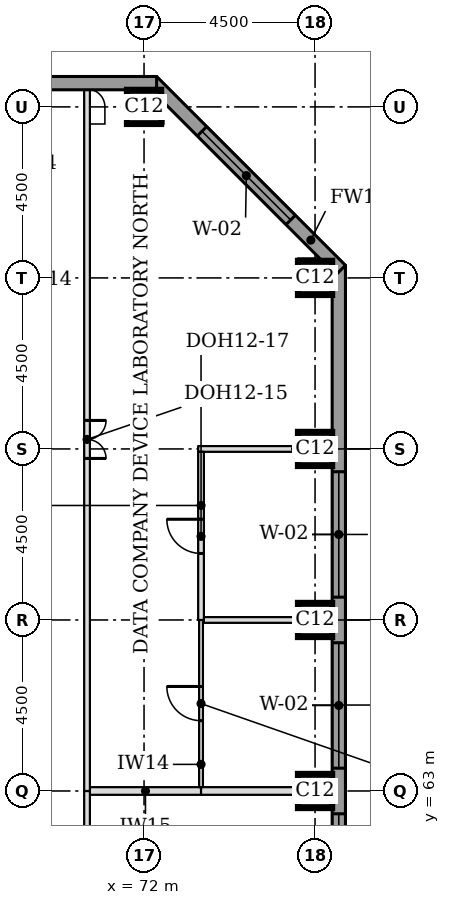
"""IFC4 building model, lengths in metres.
Left out: names, types, materials, properties, quantities, classifications, styles, units other than length and angle.
Written with IfcOpenShell. Run it as: python <this file> out.ifc"""

import sys

from ifc_helpers import new_model, si_unit, direction, frame, frame_2d, origin, origin_2d, place, context, subcontext, project, spatial, rectangle, extrude, element, fill, save


model = new_model("IFC4")
c1 = context("Model", 3, precision=1e-05, world=origin(), true_north=direction((0.0, 1.0)))
c2 = subcontext(c1, "Body", "Model", "MODEL_VIEW")
j1 = project(units=[si_unit("LENGTHUNIT", "METRE"), si_unit("PLANEANGLEUNIT", "RADIAN")], contexts=[c1])
p1 = place(None, origin())
s1 = spatial("IfcSite", under=j1, at=p1, CompositionType="ELEMENT")
p2 = place(p1, origin())
s2 = spatial("IfcBuilding", under=s1, at=p2, CompositionType="ELEMENT")
p3 = place(p2, frame((0.0, 0.0, 245.2)))
s3 = spatial("IfcBuildingStorey", under=s2, at=p3, CompositionType="ELEMENT", Elevation=245.2)
for number, where, z_axis, x_axis in (
    (1, (76.5, 63.0, 0.0), (0.0, 0.0, 1.0), (1.0, 0.0, 0.0)),
    (2, (76.5, 67.5, 0.0), (0.0, 0.0, 1.0), (1.0, 0.0, 0.0)),
    (3, (76.5, 72.0, 0.0), (0.0, 0.0, 1.0), (1.0, 0.0, 0.0)),
    (4, (76.5, 76.5, 0.0), (0.0, 0.0, 1.0), (1.0, 0.0, 0.0)),
    (5, (72.0, 81.0, 0.0), (0.0, 0.0, 1.0), (1.0, 0.0, 0.0)),
):
    element("IfcColumn", number, at=place(p3, frame(where, z_axis=z_axis, x_axis=x_axis)), inside=s3, PredefinedType="COLUMN", context=c2, shape_type="SweptSolid", body=[
        extrude(rectangle(XDim=0.9, YDim=0.9, at=origin_2d()), origin(), (0.0, 0.0, 1.0), 3.7),
    ])
p4 = place(p3, frame((77.125, 44.669, 0.0), z_axis=(0.0, 0.0, 1.0), x_axis=(0.0, 1.0, 0.0)))
e6 = element("IfcWall", 6, at=p4, inside=s3, PredefinedType="STANDARD", context=c2, shape_type="SweptSolid", body=[
    extrude(rectangle(XDim=32.163, YDim=0.35, at=frame_2d((16.081, 0.0))), origin(), (0.0, 0.0, 1.0), 3.525),
])
p5 = place(p4, frame((5.431, 0.0, 0.9)))
e7 = element("IfcOpeningElement", 7, at=p5, cuts=e6, PredefinedType="OPENING", context=c2, shape_type="SweptSolid", body=[
    extrude(rectangle(XDim=3.3, YDim=1.9, at=frame_2d((1.65, 0.95))), frame((0.0, 0.185, 0.0), z_axis=(0.0, -1.0, 0.0), x_axis=(1.0, 0.0, 0.0)), (0.0, 0.0, 1.0), 0.37),
])
p6 = place(p4, frame((9.931, 0.0, 0.9)))
e8 = element("IfcOpeningElement", 8, at=p6, cuts=e6, PredefinedType="OPENING", context=c2, shape_type="SweptSolid", body=[
    extrude(rectangle(XDim=3.3, YDim=1.9, at=frame_2d((1.65, 0.95))), frame((0.0, 0.185, 0.0), z_axis=(0.0, -1.0, 0.0), x_axis=(1.0, 0.0, 0.0)), (0.0, 0.0, 1.0), 0.37),
])
p7 = place(p4, frame((14.431, 0.0, 0.9)))
e9 = element("IfcOpeningElement", 9, at=p7, cuts=e6, PredefinedType="OPENING", context=c2, shape_type="SweptSolid", body=[
    extrude(rectangle(XDim=3.3, YDim=1.9, at=frame_2d((1.65, 0.95))), frame((0.0, 0.185, 0.0), z_axis=(0.0, -1.0, 0.0), x_axis=(1.0, 0.0, 0.0)), (0.0, 0.0, 1.0), 0.37),
])
p8 = place(p4, frame((18.931, 0.0, 0.9)))
e10 = element("IfcOpeningElement", 10, at=p8, cuts=e6, PredefinedType="OPENING", context=c2, shape_type="SweptSolid", body=[
    extrude(rectangle(XDim=3.3, YDim=1.9, at=frame_2d((1.65, 0.95))), frame((0.0, 0.185, 0.0), z_axis=(0.0, -1.0, 0.0), x_axis=(1.0, 0.0, 0.0)), (0.0, 0.0, 1.0), 0.37),
])
p9 = place(p4, frame((23.431, 0.0, 0.9)))
e11 = element("IfcOpeningElement", 11, at=p9, cuts=e6, PredefinedType="OPENING", context=c2, shape_type="SweptSolid", body=[
    extrude(rectangle(XDim=3.3, YDim=1.9, at=frame_2d((1.65, 0.95))), frame((0.0, 0.185, 0.0), z_axis=(0.0, -1.0, 0.0), x_axis=(1.0, 0.0, 0.0)), (0.0, 0.0, 1.0), 0.37),
])
p10 = place(p3, frame((77.176, 76.708, 0.0), z_axis=(0.0, 0.0, 1.0), x_axis=(-0.707106781187, 0.707106781187, 0.0)))
e12 = element("IfcWall", 12, at=p10, inside=s3, PredefinedType="STANDARD", context=c2, shape_type="SweptSolid", body=[
    extrude(rectangle(XDim=7.027, YDim=0.35, at=frame_2d((3.513, 0.0))), origin(), (0.0, 0.0, 1.0), 3.525),
])
p11 = place(p10, frame((1.863, 0.0, 0.9)))
e13 = element("IfcOpeningElement", 13, at=p11, cuts=e12, PredefinedType="OPENING", context=c2, shape_type="SweptSolid", body=[
    extrude(rectangle(XDim=3.3, YDim=1.9, at=frame_2d((1.65, 0.95))), frame((0.0, 0.185, 0.0), z_axis=(0.0, -1.0, 0.0), x_axis=(1.0, 0.0, 0.0)), (0.0, 0.0, 1.0), 0.37),
])
p12 = place(p3, frame((72.331, 81.625, 0.0), z_axis=(0.0, 0.0, 1.0), x_axis=(-1.0, 0.0, 0.0)))
e14 = element("IfcWall", 14, at=p12, inside=s3, PredefinedType="STANDARD", context=c2, shape_type="SweptSolid", body=[
    extrude(rectangle(XDim=32.163, YDim=0.35, at=frame_2d((16.081, 0.0))), origin(), (0.0, 0.0, 1.0), 3.525),
])
p13 = place(p12, frame((5.431, 0.0, 0.9)))
e15 = element("IfcOpeningElement", 15, at=p13, cuts=e14, PredefinedType="OPENING", context=c2, shape_type="SweptSolid", body=[
    extrude(rectangle(XDim=3.3, YDim=1.9, at=frame_2d((1.65, 0.95))), frame((0.0, 0.185, 0.0), z_axis=(0.0, -1.0, 0.0), x_axis=(1.0, 0.0, 0.0)), (0.0, 0.0, 1.0), 0.37),
])
p14 = place(p12, frame((9.931, 0.0, 0.9)))
e16 = element("IfcOpeningElement", 16, at=p14, cuts=e14, PredefinedType="OPENING", context=c2, shape_type="SweptSolid", body=[
    extrude(rectangle(XDim=3.3, YDim=1.9, at=frame_2d((1.65, 0.95))), frame((0.0, 0.185, 0.0), z_axis=(0.0, -1.0, 0.0), x_axis=(1.0, 0.0, 0.0)), (0.0, 0.0, 1.0), 0.37),
])
p15 = place(p12, frame((14.431, 0.0, 0.9)))
e17 = element("IfcOpeningElement", 17, at=p15, cuts=e14, PredefinedType="OPENING", context=c2, shape_type="SweptSolid", body=[
    extrude(rectangle(XDim=3.3, YDim=1.9, at=frame_2d((1.65, 0.95))), frame((0.0, 0.185, 0.0), z_axis=(0.0, -1.0, 0.0), x_axis=(1.0, 0.0, 0.0)), (0.0, 0.0, 1.0), 0.37),
])
p16 = place(p12, frame((18.931, 0.0, 0.9)))
e18 = element("IfcOpeningElement", 18, at=p16, cuts=e14, PredefinedType="OPENING", context=c2, shape_type="SweptSolid", body=[
    extrude(rectangle(XDim=3.3, YDim=1.9, at=frame_2d((1.65, 0.95))), frame((0.0, 0.185, 0.0), z_axis=(0.0, -1.0, 0.0), x_axis=(1.0, 0.0, 0.0)), (0.0, 0.0, 1.0), 0.37),
])
p17 = place(p12, frame((23.431, 0.0, 0.9)))
e19 = element("IfcOpeningElement", 19, at=p17, cuts=e14, PredefinedType="OPENING", context=c2, shape_type="SweptSolid", body=[
    extrude(rectangle(XDim=3.3, YDim=1.9, at=frame_2d((1.65, 0.95))), frame((0.0, 0.185, 0.0), z_axis=(0.0, -1.0, 0.0), x_axis=(1.0, 0.0, 0.0)), (0.0, 0.0, 1.0), 0.37),
])
p18 = place(p3, frame((70.575, 63.0, 0.0), z_axis=(0.0, 0.0, 1.0), x_axis=(1.0, 0.0, 0.0)))
e20 = element("IfcWall", 20, at=p18, inside=s3, PredefinedType="PARTITIONING", context=c2, shape_type="SweptSolid", body=[
    extrude(rectangle(XDim=2.925, YDim=0.2, at=frame_2d((1.462, 0.0))), origin(), (0.0, 0.0, 1.0), 3.55),
])
p19 = place(p3, frame((73.5, 63.0, 0.0), z_axis=(0.0, 0.0, 1.0), x_axis=(1.0, 0.0, 0.0)))
e21 = element("IfcWall", 21, at=p19, inside=s3, PredefinedType="PARTITIONING", context=c2, shape_type="SweptSolid", body=[
    extrude(rectangle(XDim=3.45, YDim=0.2, at=frame_2d((1.725, 0.0))), origin(), (0.0, 0.0, 1.0), 3.55),
])
p20 = place(p3, frame((73.575, 67.5, 0.0), z_axis=(0.0, 0.0, 1.0), x_axis=(1.0, 0.0, 0.0)))
e22 = element("IfcWall", 22, at=p20, inside=s3, PredefinedType="PARTITIONING", context=c2, shape_type="SweptSolid", body=[
    extrude(rectangle(XDim=3.375, YDim=0.15, at=frame_2d((1.688, 0.0))), origin(), (0.0, 0.0, 1.0), 3.55),
])
p21 = place(p3, frame((73.425, 72.0, 0.0), z_axis=(0.0, 0.0, 1.0), x_axis=(1.0, 0.0, 0.0)))
e23 = element("IfcWall", 23, at=p21, inside=s3, PredefinedType="PARTITIONING", context=c2, shape_type="SweptSolid", body=[
    extrude(rectangle(XDim=3.525, YDim=0.15, at=frame_2d((1.762, 0.0))), origin(), (0.0, 0.0, 1.0), 3.55),
])
p22 = place(p3, frame((70.5, 45.0, 0.0), z_axis=(0.0, 0.0, 1.0), x_axis=(0.0, 1.0, 0.0)))
e24 = element("IfcWall", 24, at=p22, inside=s3, PredefinedType="PARTITIONING", context=c2, shape_type="SweptSolid", body=[
    extrude(rectangle(XDim=18.0, YDim=0.15, at=frame_2d((9.0, 0.0))), origin(), (0.0, 0.0, 1.0), 3.55),
])
p23 = place(p22, frame((8.5, 0.0, 0.0)))
e25 = element("IfcOpeningElement", 25, at=p23, cuts=e24, PredefinedType="OPENING", context=c2, shape_type="SweptSolid", body=[
    extrude(rectangle(XDim=1.0, YDim=2.1, at=frame_2d((0.5, 1.05))), frame((0.0, 0.085, 0.0), z_axis=(0.0, -1.0, 0.0), x_axis=(1.0, 0.0, 0.0)), (0.0, 0.0, 1.0), 0.17),
])
p24 = place(p3, frame((70.5, 63.0, 0.0), z_axis=(0.0, 0.0, 1.0), x_axis=(0.0, 1.0, 0.0)))
e26 = element("IfcWall", 26, at=p24, inside=s3, PredefinedType="PARTITIONING", context=c2, shape_type="SweptSolid", body=[
    extrude(rectangle(XDim=18.45, YDim=0.15, at=frame_2d((9.225, 0.0))), origin(), (0.0, 0.0, 1.0), 3.55),
])
p25 = place(p24, frame((8.75, 0.0, 0.0)))
e27 = element("IfcOpeningElement", 27, at=p25, cuts=e26, PredefinedType="OPENING", context=c2, shape_type="SweptSolid", body=[
    extrude(rectangle(XDim=1.0, YDim=2.1, at=frame_2d((0.5, 1.05))), frame((0.0, 0.085, 0.0), z_axis=(0.0, -1.0, 0.0), x_axis=(1.0, 0.0, 0.0)), (0.0, 0.0, 1.0), 0.17),
])
p26 = place(p3, frame((73.5, 63.1, 0.0), z_axis=(0.0, 0.0, 1.0), x_axis=(0.0, 1.0, 0.0)))
e28 = element("IfcWall", 28, at=p26, inside=s3, PredefinedType="PARTITIONING", context=c2, shape_type="SweptSolid", body=[
    extrude(rectangle(XDim=4.4, YDim=0.1, at=frame_2d((2.2, 0.0))), origin(), (0.0, 0.0, 1.0), 3.55),
])
p27 = place(p26, frame((1.75, 0.0, 0.0)))
e29 = element("IfcOpeningElement", 29, at=p27, cuts=e28, PredefinedType="OPENING", context=c2, shape_type="SweptSolid", body=[
    extrude(rectangle(XDim=0.9, YDim=2.1, at=frame_2d((0.45, 1.05))), frame((0.0, 0.06, 0.0), z_axis=(0.0, -1.0, 0.0), x_axis=(1.0, 0.0, 0.0)), (0.0, 0.0, 1.0), 0.12),
])
p28 = place(p3, frame((73.5, 67.5, 0.0), z_axis=(0.0, 0.0, 1.0), x_axis=(0.0, 1.0, 0.0)))
e30 = element("IfcWall", 30, at=p28, inside=s3, PredefinedType="PARTITIONING", context=c2, shape_type="SweptSolid", body=[
    extrude(rectangle(XDim=4.425, YDim=0.15, at=frame_2d((2.212, 0.0))), origin(), (0.0, 0.0, 1.0), 3.55),
])
p29 = place(p28, frame((1.75, 0.0, 0.0)))
e31 = element("IfcOpeningElement", 31, at=p29, cuts=e30, PredefinedType="OPENING", context=c2, shape_type="SweptSolid", body=[
    extrude(rectangle(XDim=0.9, YDim=2.1, at=frame_2d((0.45, 1.05))), frame((0.0, 0.085, 0.0), z_axis=(0.0, -1.0, 0.0), x_axis=(1.0, 0.0, 0.0)), (0.0, 0.0, 1.0), 0.17),
])
p30 = place(p7, origin())
e32 = element("IfcWindow", 32, at=p30, inside=s3, PartitioningType="SINGLE_PANEL", PredefinedType="WINDOW", context=c2, shape_type="SweptSolid", body=[
    extrude(rectangle(XDim=3.3, YDim=1.9, at=frame_2d((1.65, 0.95))), frame((0.0, 0.085, 0.0), z_axis=(0.0, -1.0, 0.0), x_axis=(1.0, 0.0, 0.0)), (0.0, 0.0, 1.0), 0.06),
])
fill(e9, e32)
p31 = place(p8, origin())
e33 = element("IfcWindow", 33, at=p31, inside=s3, PartitioningType="SINGLE_PANEL", PredefinedType="WINDOW", context=c2, shape_type="SweptSolid", body=[
    extrude(rectangle(XDim=3.3, YDim=1.9, at=frame_2d((1.65, 0.95))), frame((0.0, 0.085, 0.0), z_axis=(0.0, -1.0, 0.0), x_axis=(1.0, 0.0, 0.0)), (0.0, 0.0, 1.0), 0.06),
])
fill(e10, e33)
p32 = place(p9, origin())
e34 = element("IfcWindow", 34, at=p32, inside=s3, PartitioningType="SINGLE_PANEL", PredefinedType="WINDOW", context=c2, shape_type="SweptSolid", body=[
    extrude(rectangle(XDim=3.3, YDim=1.9, at=frame_2d((1.65, 0.95))), frame((0.0, 0.085, 0.0), z_axis=(0.0, -1.0, 0.0), x_axis=(1.0, 0.0, 0.0)), (0.0, 0.0, 1.0), 0.06),
])
fill(e11, e34)
p33 = place(p11, origin())
e35 = element("IfcWindow", 35, at=p33, inside=s3, PartitioningType="SINGLE_PANEL", PredefinedType="WINDOW", context=c2, shape_type="SweptSolid", body=[
    extrude(rectangle(XDim=3.3, YDim=1.9, at=frame_2d((1.65, 0.95))), frame((0.0, 0.085, 0.0), z_axis=(0.0, -1.0, 0.0), x_axis=(1.0, 0.0, 0.0)), (0.0, 0.0, 1.0), 0.06),
])
fill(e13, e35)
p34 = place(p25, frame((1.0, 0.0, 0.0), z_axis=(0.0, 0.0, 1.0), x_axis=(-1.0, 0.0, 0.0)))
e36 = element("IfcDoor", 36, at=p34, inside=s3, OperationType="DOUBLE_DOOR_SINGLE_SWING", PredefinedType="DOOR", context=c2, shape_type="SweptSolid", body=[
    extrude(rectangle(XDim=1.0, YDim=2.1, at=frame_2d((0.5, 1.05))), frame((0.0, 0.025, 0.0), z_axis=(0.0, -1.0, 0.0), x_axis=(1.0, 0.0, 0.0)), (0.0, 0.0, 1.0), 0.05),
])
fill(e27, e36)
p35 = place(p27, origin())
e37 = element("IfcDoor", 37, at=p35, inside=s3, OperationType="SINGLE_SWING_RIGHT", PredefinedType="DOOR", context=c2, shape_type="SweptSolid", body=[
    extrude(rectangle(XDim=0.9, YDim=2.1, at=frame_2d((0.45, 1.05))), frame((0.0, 0.025, 0.0), z_axis=(0.0, -1.0, 0.0), x_axis=(1.0, 0.0, 0.0)), (0.0, 0.0, 1.0), 0.05),
])
fill(e29, e37)
p36 = place(p29, origin())
e38 = element("IfcDoor", 38, at=p36, inside=s3, OperationType="SINGLE_SWING_RIGHT", PredefinedType="DOOR", context=c2, shape_type="SweptSolid", body=[
    extrude(rectangle(XDim=0.9, YDim=2.1, at=frame_2d((0.45, 1.05))), frame((0.0, 0.025, 0.0), z_axis=(0.0, -1.0, 0.0), x_axis=(1.0, 0.0, 0.0)), (0.0, 0.0, 1.0), 0.05),
])
fill(e31, e38)
save(model, sys.argv[1])
